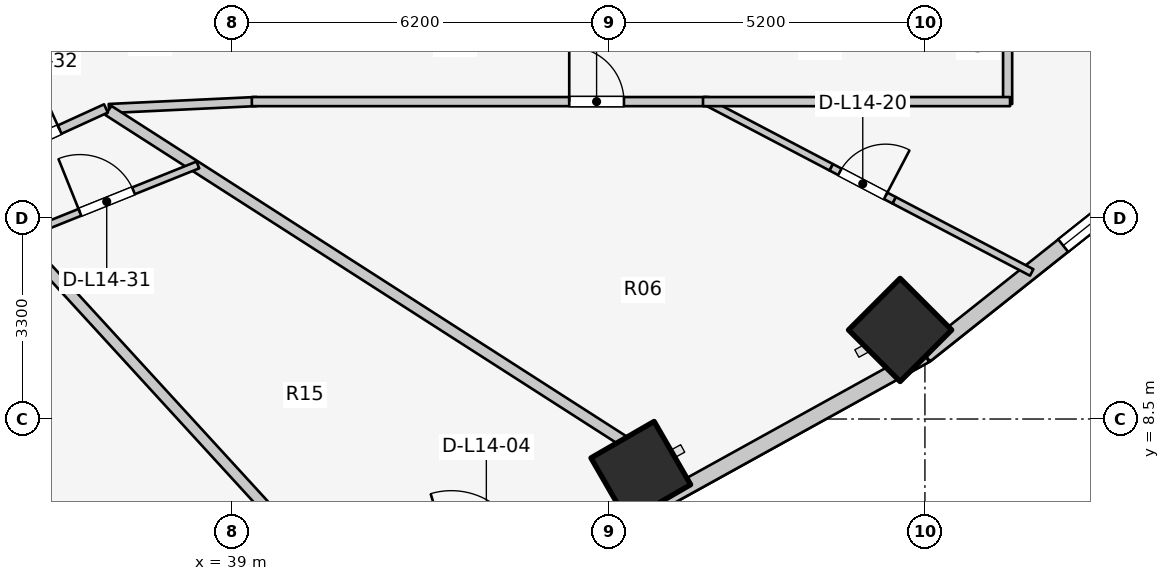
"""IFC4 building model, lengths in metres.
Left out: names, types, materials, properties, quantities, classifications, styles, units other than length and angle.
Written with IfcOpenShell. Run it as: python <this file> out.ifc"""

import sys

from ifc_helpers import new_model, si_unit, direction, frame, frame_2d, origin, origin_2d, place, context, subcontext, project, spatial, rectangle, extrude, element, fill, save


model = new_model("IFC4")
c1 = context("Model", 3, precision=1e-05, world=origin(), true_north=direction((0.0, 1.0)))
c2 = subcontext(c1, "Body", "Model", "MODEL_VIEW")
j1 = project(units=[si_unit("LENGTHUNIT", "METRE"), si_unit("PLANEANGLEUNIT", "RADIAN")], contexts=[c1])
p1 = place(None, origin())
s1 = spatial("IfcSite", under=j1, at=p1, CompositionType="ELEMENT")
p2 = place(p1, origin())
s2 = spatial("IfcBuilding", under=s1, at=p2, CompositionType="ELEMENT")
p3 = place(p2, frame((0.0, 0.0, 49.3)))
s3 = spatial("IfcBuildingStorey", under=s2, at=p3, CompositionType="ELEMENT", Elevation=49.3)
for number, where, z_axis, x_axis in (
    (1, (45.727, 7.641, 0.0), (0.0, 0.0, 1.0), (0.5, -0.866, 0.0)),
    (2, (49.992, 9.965, 0.0), (0.0, 0.0, 1.0), (0.707, -0.707, 0.0)),
):
    element("IfcColumn", number, at=place(p3, frame(where, z_axis=z_axis, x_axis=x_axis)), inside=s3, PredefinedType="COLUMN", context=c2, shape_type="SweptSolid", body=[
        extrude(rectangle(XDim=1.2, YDim=1.2, at=origin_2d()), origin(), (0.0, 0.0, 1.0), 3.1),
    ])
p4 = place(p3, frame((40.332, 5.447, 0.0), z_axis=(0.0, 0.0, 1.0), x_axis=(0.958843593522, 0.283934786811, 0.0)))
e3 = element("IfcWall", 3, at=p4, inside=s3, PredefinedType="STANDARD", context=c2, shape_type="SweptSolid", body=[
    extrude(rectangle(XDim=5.955, YDim=0.26, at=frame_2d((2.978, 0.0))), origin(), (0.0, 0.0, 1.0), 2.88),
])
p5 = place(p4, frame((2.378, 0.0, 0.0)))
e4 = element("IfcOpeningElement", 4, at=p5, cuts=e3, PredefinedType="OPENING", context=c2, shape_type="SweptSolid", body=[
    extrude(rectangle(XDim=1.2, YDim=2.2, at=frame_2d((0.6, 1.1))), frame((0.0, 0.14, 0.0), z_axis=(0.0, -1.0, 0.0), x_axis=(1.0, 0.0, 0.0)), (0.0, 0.0, 1.0), 0.28),
])
p6 = place(p3, frame((46.042, 7.138, 0.0), z_axis=(0.0, 0.0, 1.0), x_axis=(0.875137303239, 0.483874674352, 0.0)))
e5 = element("IfcWall", 5, at=p6, inside=s3, PredefinedType="STANDARD", context=c2, shape_type="SweptSolid", body=[
    extrude(rectangle(XDim=4.985, YDim=0.26, at=frame_2d((2.493, 0.0))), origin(), (0.0, 0.0, 1.0), 2.85),
])
p7 = place(p3, frame((50.405, 9.55, 0.0), z_axis=(0.0, 0.0, 1.0), x_axis=(0.783123133379, 0.621866672179, 0.0)))
e6 = element("IfcWall", 6, at=p7, inside=s3, PredefinedType="STANDARD", context=c2, shape_type="SweptSolid", body=[
    extrude(rectangle(XDim=4.839, YDim=0.26, at=frame_2d((2.419, 0.0))), origin(), (0.0, 0.0, 1.0), 2.85),
])
p8 = place(p7, frame((2.898, 0.0, 0.75)))
e7 = element("IfcOpeningElement", 7, at=p8, cuts=e6, PredefinedType="OPENING", context=c2, shape_type="SweptSolid", body=[
    extrude(rectangle(XDim=1.2, YDim=1.5, at=frame_2d((0.6, 0.75))), frame((0.0, 0.14, 0.0), z_axis=(0.0, -1.0, 0.0), x_axis=(1.0, 0.0, 0.0)), (0.0, 0.0, 1.0), 0.28),
])
p9 = place(p3, frame((34.127, 14.094, 0.0), z_axis=(0.0, 0.0, 1.0), x_axis=(0.906943449489, 0.421252393975, 0.0)))
e8 = element("IfcWall", 8, at=p9, inside=s3, PredefinedType="PARTITIONING", context=c2, shape_type="SweptSolid", body=[
    extrude(rectangle(XDim=2.186, YDim=0.15, at=frame_2d((1.093, 0.0))), origin(), (0.0, 0.0, 1.0), 2.237),
])
p10 = place(p3, frame((51.76, 13.68, 0.0), z_axis=(0.0, 0.0, 1.0), x_axis=(0.0, 1.0, 0.0)))
e9 = element("IfcWall", 9, at=p10, inside=s3, PredefinedType="PARTITIONING", context=c2, shape_type="SweptSolid", body=[
    extrude(rectangle(XDim=3.148, YDim=0.15, at=frame_2d((1.574, 0.0))), origin(), (0.0, 0.0, 1.0), 2.855),
])
p11 = place(p3, frame((46.756, 13.743, 0.0), z_axis=(0.0, 0.0, 1.0), x_axis=(0.885586030676, -0.464475383924, 0.0)))
e10 = element("IfcWall", 10, at=p11, inside=s3, PredefinedType="MOVABLE", context=c2, shape_type="SweptSolid", body=[
    extrude(rectangle(XDim=2.376, YDim=0.12, at=frame_2d((1.188, 0.0))), origin(), (0.0, 0.0, 1.0), 2.855),
])
p12 = place(p3, frame((48.86, 12.64, 0.0), z_axis=(0.0, 0.0, 1.0), x_axis=(0.885447282698, -0.464739829972, 0.0)))
e11 = element("IfcWall", 11, at=p12, inside=s3, PredefinedType="MOVABLE", context=c2, shape_type="SweptSolid", body=[
    extrude(rectangle(XDim=1.17, YDim=0.12, at=frame_2d((0.585, 0.0))), origin(), (0.0, 0.0, 1.0), 2.11),
])
p13 = place(p12, frame((0.16, 0.0, 0.0)))
e12 = element("IfcOpeningElement", 12, at=p13, cuts=e11, PredefinedType="OPENING", context=c2, shape_type="SweptSolid", body=[
    extrude(rectangle(XDim=0.85, YDim=2.05, at=frame_2d((0.425, 1.025))), frame((0.0, 0.07, 0.0), z_axis=(0.0, -1.0, 0.0), x_axis=(1.0, 0.0, 0.0)), (0.0, 0.0, 1.0), 0.14),
])
p14 = place(p3, frame((49.896, 12.096, 0.0), z_axis=(0.0, 0.0, 1.0), x_axis=(0.885573027611, -0.464500175208, 0.0)))
e13 = element("IfcWall", 13, at=p14, inside=s3, PredefinedType="MOVABLE", context=c2, shape_type="SweptSolid", body=[
    extrude(rectangle(XDim=2.552, YDim=0.12, at=frame_2d((1.276, 0.0))), origin(), (0.0, 0.0, 1.0), 2.069),
])
p15 = place(p3, frame((36.98, 13.606, 0.0), z_axis=(0.0, 0.0, 1.0), x_axis=(0.998877427952, 0.047369651964, 0.0)))
e14 = element("IfcWall", 14, at=p15, inside=s3, PredefinedType="PARTITIONING", context=c2, shape_type="SweptSolid", body=[
    extrude(rectangle(XDim=2.433, YDim=0.15, at=frame_2d((1.216, 0.0))), origin(), (0.0, 0.0, 1.0), 2.237),
])
p16 = place(p3, frame((39.33, 13.72, 0.0), z_axis=(0.0, 0.0, 1.0), x_axis=(1.0, 0.0, 0.0)))
e15 = element("IfcWall", 15, at=p16, inside=s3, PredefinedType="PARTITIONING", context=c2, shape_type="SweptSolid", body=[
    extrude(rectangle(XDim=7.52, YDim=0.15, at=frame_2d((3.76, 0.0))), origin(), (0.0, 0.0, 1.0), 2.237),
])
p17 = place(p16, frame((5.22, 0.0, 0.0)))
e16 = element("IfcOpeningElement", 16, at=p17, cuts=e15, PredefinedType="OPENING", context=c2, shape_type="SweptSolid", body=[
    extrude(rectangle(XDim=0.9, YDim=2.1, at=frame_2d((0.45, 1.05))), frame((0.0, 0.085, 0.0), z_axis=(0.0, -1.0, 0.0), x_axis=(1.0, 0.0, 0.0)), (0.0, 0.0, 1.0), 0.17),
])
p18 = place(p3, frame((46.75, 13.72, 0.0), z_axis=(0.0, 0.0, 1.0), x_axis=(1.0, 0.0, 0.0)))
e17 = element("IfcWall", 17, at=p18, inside=s3, PredefinedType="PARTITIONING", context=c2, shape_type="SweptSolid", body=[
    extrude(rectangle(XDim=5.05, YDim=0.15, at=frame_2d((2.525, 0.0))), origin(), (0.0, 0.0, 1.0), 2.069),
])
p19 = place(p3, frame((34.586, 12.479, 0.0), z_axis=(0.0, 0.0, 1.0), x_axis=(0.675465011224, -0.737392038615, 0.0)))
e18 = element("IfcWall", 18, at=p19, inside=s3, PredefinedType="PARTITIONING", context=c2, shape_type="SweptSolid", body=[
    extrude(rectangle(XDim=8.007, YDim=0.18, at=frame_2d((4.003, 0.0))), origin(), (0.0, 0.0, 1.0), 2.237),
])
p20 = place(p3, frame((36.971, 13.574, 0.0), z_axis=(0.0, 0.0, 1.0), x_axis=(0.841689919529, -0.5399611832, 0.0)))
e19 = element("IfcWall", 19, at=p20, inside=s3, PredefinedType="PARTITIONING", context=c2, shape_type="SweptSolid", body=[
    extrude(rectangle(XDim=10.058, YDim=0.18, at=frame_2d((5.029, 0.0))), origin(), (0.0, 0.0, 1.0), 2.237),
])
p21 = place(p3, frame((35.444, 11.474, 0.0), z_axis=(0.0, 0.0, 1.0), x_axis=(0.927886718772, 0.372862222713, 0.0)))
e20 = element("IfcWall", 20, at=p21, inside=s3, PredefinedType="MOVABLE", context=c2, shape_type="SweptSolid", body=[
    extrude(rectangle(XDim=3.231, YDim=0.12, at=frame_2d((1.616, 0.0))), origin(), (0.0, 0.0, 1.0), 2.237),
])
p22 = place(p21, frame((1.141, 0.0, 0.0)))
e21 = element("IfcOpeningElement", 21, at=p22, cuts=e20, PredefinedType="OPENING", context=c2, shape_type="SweptSolid", body=[
    extrude(rectangle(XDim=0.95, YDim=2.1, at=frame_2d((0.475, 1.05))), frame((0.0, 0.07, 0.0), z_axis=(0.0, -1.0, 0.0), x_axis=(1.0, 0.0, 0.0)), (0.0, 0.0, 1.0), 0.14),
])
p23 = place(p3, frame((34.543, 12.518, 0.0), z_axis=(0.0, 0.0, 1.0), x_axis=(0.909747571199, 0.415161843982, 0.0)))
e22 = element("IfcWall", 22, at=p23, inside=s3, PredefinedType="PARTITIONING", context=c2, shape_type="SweptSolid", body=[
    extrude(rectangle(XDim=2.625, YDim=0.15, at=frame_2d((1.312, 0.0))), origin(), (0.0, 0.0, 1.0), 2.237),
])
p24 = place(p23, frame((0.838, 0.0, 0.0)))
e23 = element("IfcOpeningElement", 23, at=p24, cuts=e22, PredefinedType="OPENING", context=c2, shape_type="SweptSolid", body=[
    extrude(rectangle(XDim=0.95, YDim=2.1, at=frame_2d((0.475, 1.05))), frame((0.0, 0.085, 0.0), z_axis=(0.0, -1.0, 0.0), x_axis=(1.0, 0.0, 0.0)), (0.0, 0.0, 1.0), 0.17),
])
p25 = place(p8, origin())
e24 = element("IfcWindow", 24, at=p25, inside=s3, PartitioningType="SINGLE_PANEL", PredefinedType="WINDOW", context=c2, shape_type="SweptSolid", body=[
    extrude(rectangle(XDim=1.2, YDim=1.5, at=frame_2d((0.6, 0.75))), frame((0.0, 0.03, 0.0), z_axis=(0.0, -1.0, 0.0), x_axis=(1.0, 0.0, 0.0)), (0.0, 0.0, 1.0), 0.06),
])
fill(e7, e24)
p26 = place(p13, origin())
e25 = element("IfcDoor", 25, at=p26, inside=s3, OperationType="SINGLE_SWING_RIGHT", PredefinedType="DOOR", context=c2, shape_type="SweptSolid", body=[
    extrude(rectangle(XDim=0.85, YDim=2.05, at=frame_2d((0.425, 1.025))), frame((0.0, 0.025, 0.0), z_axis=(0.0, -1.0, 0.0), x_axis=(1.0, 0.0, 0.0)), (0.0, 0.0, 1.0), 0.05),
])
fill(e12, e25)
p27 = place(p17, origin())
e26 = element("IfcDoor", 26, at=p27, inside=s3, OperationType="SINGLE_SWING_LEFT", PredefinedType="DOOR", context=c2, shape_type="SweptSolid", body=[
    extrude(rectangle(XDim=0.9, YDim=2.1, at=frame_2d((0.45, 1.05))), frame((0.0, 0.025, 0.0), z_axis=(0.0, -1.0, 0.0), x_axis=(1.0, 0.0, 0.0)), (0.0, 0.0, 1.0), 0.05),
])
fill(e16, e26)
p28 = place(p22, origin())
e27 = element("IfcDoor", 27, at=p28, inside=s3, OperationType="SINGLE_SWING_LEFT", PredefinedType="DOOR", context=c2, shape_type="SweptSolid", body=[
    extrude(rectangle(XDim=0.95, YDim=2.1, at=frame_2d((0.475, 1.05))), frame((0.0, 0.025, 0.0), z_axis=(0.0, -1.0, 0.0), x_axis=(1.0, 0.0, 0.0)), (0.0, 0.0, 1.0), 0.05),
])
fill(e21, e27)
p29 = place(p24, origin())
e28 = element("IfcDoor", 28, at=p29, inside=s3, OperationType="SINGLE_SWING_RIGHT", PredefinedType="DOOR", context=c2, shape_type="SweptSolid", body=[
    extrude(rectangle(XDim=0.95, YDim=2.1, at=frame_2d((0.475, 1.05))), frame((0.0, 0.025, 0.0), z_axis=(0.0, -1.0, 0.0), x_axis=(1.0, 0.0, 0.0)), (0.0, 0.0, 1.0), 0.05),
])
fill(e23, e28)
save(model, sys.argv[1])
